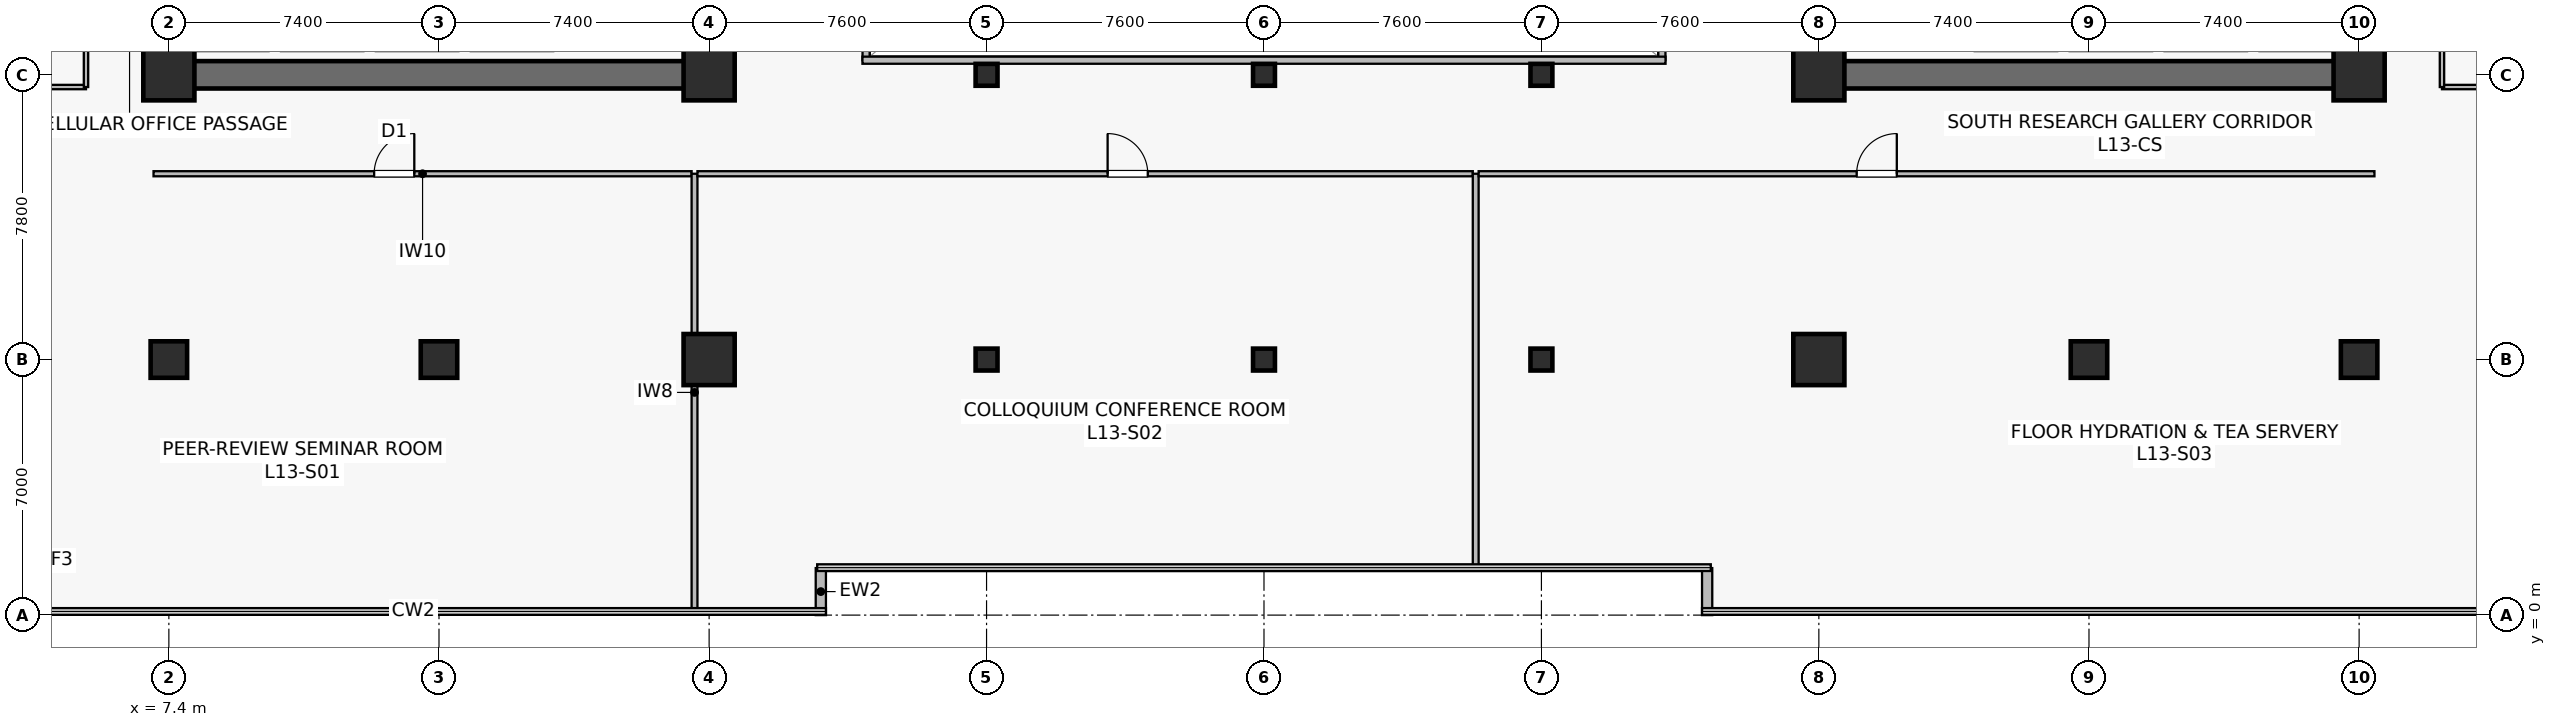
"""IFC4 building model, lengths in metres.
Left out: names, types, materials, properties, quantities, classifications, styles, units other than length and angle.
Written with IfcOpenShell. Run it as: python <this file> out.ifc"""

import sys

from ifc_helpers import new_model, si_unit, direction, frame, frame_2d, origin, origin_2d, place, context, subcontext, project, spatial, rectangle, hollow_rectangle, extrude, source, transform, mapped, element, fill, save


model = new_model("IFC4")
c1 = context("Model", 3, precision=1e-05, world=origin(), true_north=direction((0.0, 1.0)))
c2 = subcontext(c1, "Body", "Model", "MODEL_VIEW")
j1 = project(units=[si_unit("LENGTHUNIT", "METRE"), si_unit("PLANEANGLEUNIT", "RADIAN")], contexts=[c1])
p1 = place(None, origin())
s1 = spatial("IfcSite", under=j1, at=p1, CompositionType="ELEMENT")
p2 = place(p1, origin())
s2 = spatial("IfcBuilding", under=s1, at=p2, CompositionType="ELEMENT")
p3 = place(p2, frame((0.0, 0.0, 53.9)))
s3 = spatial("IfcBuildingStorey", under=s2, at=p3, CompositionType="ELEMENT", Elevation=53.9)
p4 = place(p3, frame((7.025, 14.8, 0.0), z_axis=(0.0, 0.0, 1.0), x_axis=(1.0, 0.0, 0.0)))
e1 = element("IfcWall", 1, at=p4, inside=s3, PredefinedType="SHEAR", context=c2, shape_type="SweptSolid", body=[
    extrude(rectangle(XDim=15.55, YDim=0.75, at=frame_2d((7.775, 0.0))), origin(), (0.0, 0.0, 1.0), 3.78),
])
p5 = place(p3, frame((7.4, 15.175, 0.0), z_axis=(0.0, 0.0, 1.0), x_axis=(0.0, 1.0, 0.0)))
e2 = element("IfcWall", 2, at=p5, inside=s3, PredefinedType="SHEAR", context=c2, shape_type="SweptSolid", body=[
    extrude(rectangle(XDim=18.25, YDim=0.75, at=frame_2d((9.125, 0.0))), origin(), (0.0, 0.0, 1.0), 3.78),
])
p6 = place(p3, frame((22.2, 15.175, 0.0), z_axis=(0.0, 0.0, 1.0), x_axis=(0.0, 1.0, 0.0)))
e3 = element("IfcWall", 3, at=p6, inside=s3, PredefinedType="SHEAR", context=c2, shape_type="SweptSolid", body=[
    extrude(rectangle(XDim=18.25, YDim=0.75, at=frame_2d((9.125, 0.0))), origin(), (0.0, 0.0, 1.0), 3.78),
])
p7 = place(p6, frame((3.375, 0.0, 0.0)))
e4 = element("IfcOpeningElement", 4, at=p7, cuts=e3, PredefinedType="OPENING", context=c2, shape_type="SweptSolid", body=[
    extrude(rectangle(XDim=1.42, YDim=2.2, at=frame_2d((0.71, 1.1))), frame((0.0, 0.385, 0.0), z_axis=(0.0, -1.0, 0.0), x_axis=(1.0, 0.0, 0.0)), (0.0, 0.0, 1.0), 0.77),
])
p8 = place(p3, frame((52.225, 14.8, 0.0), z_axis=(0.0, 0.0, 1.0), x_axis=(1.0, 0.0, 0.0)))
e5 = element("IfcWall", 5, at=p8, inside=s3, PredefinedType="SHEAR", context=c2, shape_type="SweptSolid", body=[
    extrude(rectangle(XDim=15.55, YDim=0.75, at=frame_2d((7.775, 0.0))), origin(), (0.0, 0.0, 1.0), 3.78),
])
p9 = place(p3, frame((52.6, 15.175, 0.0), z_axis=(0.0, 0.0, 1.0), x_axis=(0.0, 1.0, 0.0)))
e6 = element("IfcWall", 6, at=p9, inside=s3, PredefinedType="SHEAR", context=c2, shape_type="SweptSolid", body=[
    extrude(rectangle(XDim=18.25, YDim=0.75, at=frame_2d((9.125, 0.0))), origin(), (0.0, 0.0, 1.0), 3.78),
])
p10 = place(p9, frame((3.375, 0.0, 0.0)))
e7 = element("IfcOpeningElement", 7, at=p10, cuts=e6, PredefinedType="OPENING", context=c2, shape_type="SweptSolid", body=[
    extrude(rectangle(XDim=1.42, YDim=2.2, at=frame_2d((0.71, 1.1))), frame((0.0, 0.385, 0.0), z_axis=(0.0, -1.0, 0.0), x_axis=(1.0, 0.0, 0.0)), (0.0, 0.0, 1.0), 0.77),
])
p11 = place(p3, frame((67.4, 15.175, 0.0), z_axis=(0.0, 0.0, 1.0), x_axis=(0.0, 1.0, 0.0)))
e8 = element("IfcWall", 8, at=p11, inside=s3, PredefinedType="SHEAR", context=c2, shape_type="SweptSolid", body=[
    extrude(rectangle(XDim=18.25, YDim=0.75, at=frame_2d((9.125, 0.0))), origin(), (0.0, 0.0, 1.0), 3.78),
])
m1 = source(origin(), c2, "Body", "SweptSolid", [
    extrude(rectangle(XDim=1.0, YDim=1.0, at=origin_2d()), origin(), (0.0, 0.0, 1.0), 4.1),
])
p12 = place(p3, frame((14.8, 7.0, 0.0), z_axis=(0.0, 0.0, 1.0), x_axis=(1.0, 0.0, 0.0)))
e9 = element("IfcColumn", 9, at=p12, inside=s3, PredefinedType="COLUMN", context=c2, shape_type="MappedRepresentation", body=[
    mapped(m1, transform((0.0, 0.0, 0.0), scale=1.0)),
])
m2 = source(origin(), c2, "Body", "SweptSolid", [
    extrude(rectangle(XDim=1.4, YDim=1.4, at=origin_2d()), origin(), (0.0, 0.0, 1.0), 4.1),
])
for number, where, z_axis, x_axis in (
    (10, (22.2, 7.0, 0.0), (0.0, 0.0, 1.0), (1.0, 0.0, 0.0)),
    (11, (7.4, 14.8, 0.0), (0.0, 0.0, 1.0), (1.0, 0.0, 0.0)),
    (12, (22.2, 14.8, 0.0), (0.0, 0.0, 1.0), (1.0, 0.0, 0.0)),
    (13, (52.6, 7.0, 0.0), (0.0, 0.0, 1.0), (1.0, 0.0, 0.0)),
):
    element("IfcColumn", number, at=place(p3, frame(where, z_axis=z_axis, x_axis=x_axis)), inside=s3, PredefinedType="COLUMN", context=c2, shape_type="MappedRepresentation", body=[
        mapped(m2, transform((0.0, 0.0, 0.0), scale=1.0)),
    ])
p13 = place(p3, frame((60.0, 7.0, 0.0), z_axis=(0.0, 0.0, 1.0), x_axis=(1.0, 0.0, 0.0)))
e14 = element("IfcColumn", 14, at=p13, inside=s3, PredefinedType="COLUMN", context=c2, shape_type="MappedRepresentation", body=[
    mapped(m1, transform((0.0, 0.0, 0.0), scale=1.0)),
])
for number, where, z_axis, x_axis in (
    (15, (52.6, 14.8, 0.0), (0.0, 0.0, 1.0), (1.0, 0.0, 0.0)),
    (16, (67.4, 14.8, 0.0), (0.0, 0.0, 1.0), (1.0, 0.0, 0.0)),
):
    element("IfcColumn", number, at=place(p3, frame(where, z_axis=z_axis, x_axis=x_axis)), inside=s3, PredefinedType="COLUMN", context=c2, shape_type="MappedRepresentation", body=[
        mapped(m2, transform((0.0, 0.0, 0.0), scale=1.0)),
    ])
for number, where, z_axis, x_axis in (
    (17, (7.4, 7.0, 0.0), (0.0, 0.0, 1.0), (1.0, 0.0, 0.0)),
    (18, (67.4, 7.0, 0.0), (0.0, 0.0, 1.0), (1.0, 0.0, 0.0)),
):
    element("IfcColumn", number, at=place(p3, frame(where, z_axis=z_axis, x_axis=x_axis)), inside=s3, PredefinedType="COLUMN", context=c2, shape_type="MappedRepresentation", body=[
        mapped(m1, transform((0.0, 0.0, 0.0), scale=1.0)),
    ])
m3 = source(origin(), c2, "Body", "SweptSolid", [
    extrude(hollow_rectangle(XDim=0.6, YDim=0.6, WallThickness=0.028, at=origin_2d()), origin(), (0.0, 0.0, 1.0), 4.1),
])
for number, where, z_axis, x_axis in (
    (19, (29.8, 7.0, 0.0), (0.0, 0.0, 1.0), (1.0, 0.0, 0.0)),
    (20, (29.8, 14.8, 0.0), (0.0, 0.0, 1.0), (1.0, 0.0, 0.0)),
    (21, (37.4, 7.0, 0.0), (0.0, 0.0, 1.0), (1.0, 0.0, 0.0)),
    (22, (37.4, 14.8, 0.0), (0.0, 0.0, 1.0), (1.0, 0.0, 0.0)),
    (23, (45.0, 7.0, 0.0), (0.0, 0.0, 1.0), (1.0, 0.0, 0.0)),
    (24, (45.0, 14.8, 0.0), (0.0, 0.0, 1.0), (1.0, 0.0, 0.0)),
):
    element("IfcColumn", number, at=place(p3, frame(where, z_axis=z_axis, x_axis=x_axis)), inside=s3, PredefinedType="COLUMN", context=c2, shape_type="MappedRepresentation", body=[
        mapped(m3, transform((0.0, 0.0, 0.0), scale=1.0)),
    ])
for number, where, z_axis, x_axis in (
    (25, (25.26, 0.0, 0.0), (0.0, 0.0, 1.0), (0.0, 1.0, 0.0)),
    (26, (49.54, 1.288, 0.0), (0.0, 0.0, 1.0), (0.0, -1.0, 0.0)),
):
    element("IfcWall", number, at=place(p3, frame(where, z_axis=z_axis, x_axis=x_axis)), inside=s3, PredefinedType="STANDARD", context=c2, shape_type="SweptSolid", body=[
        extrude(rectangle(XDim=1.288, YDim=0.28, at=frame_2d((0.644, 0.0))), origin(), (0.0, 0.0, 1.0), 3.78),
    ])
p14 = place(p3, frame((26.5, 15.2, 0.0), z_axis=(0.0, 0.0, 1.0), x_axis=(0.0, 1.0, 0.0)))
e27 = element("IfcWall", 27, at=p14, inside=s3, PredefinedType="SOLIDWALL", context=c2, shape_type="SweptSolid", body=[
    extrude(rectangle(XDim=18.2, YDim=0.195, at=frame_2d((9.1, 0.0))), origin(), (0.0, 0.0, 1.0), 3.78),
])
p15 = place(p14, frame((1.8, 0.0, 0.9)))
e28 = element("IfcOpeningElement", 28, at=p15, cuts=e27, PredefinedType="OPENING", context=c2, shape_type="SweptSolid", body=[
    extrude(rectangle(XDim=1.2, YDim=1.35, at=frame_2d((0.6, 0.675))), frame((0.0, 0.107, 0.0), z_axis=(0.0, -1.0, 0.0), x_axis=(1.0, 0.0, 0.0)), (0.0, 0.0, 1.0), 0.215),
])
p16 = place(p14, frame((13.2, 0.0, 0.9)))
e29 = element("IfcOpeningElement", 29, at=p16, cuts=e27, PredefinedType="OPENING", context=c2, shape_type="SweptSolid", body=[
    extrude(rectangle(XDim=1.2, YDim=1.35, at=frame_2d((0.6, 0.675))), frame((0.0, 0.107, 0.0), z_axis=(0.0, -1.0, 0.0), x_axis=(1.0, 0.0, 0.0)), (0.0, 0.0, 1.0), 0.215),
])
p17 = place(p3, frame((48.3, 15.2, 0.0), z_axis=(0.0, 0.0, 1.0), x_axis=(0.0, 1.0, 0.0)))
e30 = element("IfcWall", 30, at=p17, inside=s3, PredefinedType="SOLIDWALL", context=c2, shape_type="SweptSolid", body=[
    extrude(rectangle(XDim=18.2, YDim=0.195, at=frame_2d((9.1, 0.0))), origin(), (0.0, 0.0, 1.0), 3.78),
])
p18 = place(p17, frame((1.8, 0.0, 0.9)))
e31 = element("IfcOpeningElement", 31, at=p18, cuts=e30, PredefinedType="OPENING", context=c2, shape_type="SweptSolid", body=[
    extrude(rectangle(XDim=1.2, YDim=1.35, at=frame_2d((0.6, 0.675))), frame((0.0, 0.107, 0.0), z_axis=(0.0, -1.0, 0.0), x_axis=(1.0, 0.0, 0.0)), (0.0, 0.0, 1.0), 0.215),
])
p19 = place(p17, frame((13.2, 0.0, 0.9)))
e32 = element("IfcOpeningElement", 32, at=p19, cuts=e30, PredefinedType="OPENING", context=c2, shape_type="SweptSolid", body=[
    extrude(rectangle(XDim=1.2, YDim=1.35, at=frame_2d((0.6, 0.675))), frame((0.0, 0.107, 0.0), z_axis=(0.0, -1.0, 0.0), x_axis=(1.0, 0.0, 0.0)), (0.0, 0.0, 1.0), 0.215),
])
p20 = place(p3, frame((26.4, 15.2, 0.0), z_axis=(0.0, 0.0, 1.0), x_axis=(1.0, 0.0, 0.0)))
e33 = element("IfcWall", 33, at=p20, inside=s3, PredefinedType="SOLIDWALL", context=c2, shape_type="SweptSolid", body=[
    extrude(rectangle(XDim=22.0, YDim=0.195, at=frame_2d((11.0, 0.0))), origin(), (0.0, 0.0, 1.0), 3.78),
])
p21 = place(p3, frame((6.98, 12.09, 0.0), z_axis=(0.0, 0.0, 1.0), x_axis=(1.0, 0.0, 0.0)))
e34 = element("IfcWall", 34, at=p21, inside=s3, PredefinedType="PARTITIONING", context=c2, shape_type="SweptSolid", body=[
    extrude(rectangle(XDim=14.74, YDim=0.14, at=frame_2d((7.37, 0.0))), origin(), (0.0, 0.0, 1.0), 3.065),
])
p22 = place(p21, frame((6.044, 0.0, 0.0)))
e35 = element("IfcOpeningElement", 35, at=p22, cuts=e34, PredefinedType="OPENING", context=c2, shape_type="SweptSolid", body=[
    extrude(rectangle(XDim=1.1, YDim=2.18, at=frame_2d((0.55, 1.09))), frame((0.0, 0.08, 0.0), z_axis=(0.0, -1.0, 0.0), x_axis=(1.0, 0.0, 0.0)), (0.0, 0.0, 1.0), 0.16),
])
p23 = place(p3, frame((21.8, 0.11, 0.0), z_axis=(0.0, 0.0, 1.0), x_axis=(0.0, 1.0, 0.0)))
e36 = element("IfcWall", 36, at=p23, inside=s3, PredefinedType="PARTITIONING", context=c2, shape_type="SweptSolid", body=[
    extrude(rectangle(XDim=11.98, YDim=0.16, at=frame_2d((5.99, 0.0))), origin(), (0.0, 0.0, 1.0), 3.015),
])
p24 = place(p3, frame((21.88, 12.09, 0.0), z_axis=(0.0, 0.0, 1.0), x_axis=(1.0, 0.0, 0.0)))
e37 = element("IfcWall", 37, at=p24, inside=s3, PredefinedType="PARTITIONING", context=c2, shape_type="SweptSolid", body=[
    extrude(rectangle(XDim=21.24, YDim=0.14, at=frame_2d((10.62, 0.0))), origin(), (0.0, 0.0, 1.0), 3.065),
])
p25 = place(p24, frame((11.236, 0.0, 0.0)))
e38 = element("IfcOpeningElement", 38, at=p25, cuts=e37, PredefinedType="OPENING", context=c2, shape_type="SweptSolid", body=[
    extrude(rectangle(XDim=1.1, YDim=2.18, at=frame_2d((0.55, 1.09))), frame((0.0, 0.08, 0.0), z_axis=(0.0, -1.0, 0.0), x_axis=(1.0, 0.0, 0.0)), (0.0, 0.0, 1.0), 0.16),
])
p26 = place(p3, frame((43.2, 1.31, 0.0), z_axis=(0.0, 0.0, 1.0), x_axis=(0.0, 1.0, 0.0)))
e39 = element("IfcWall", 39, at=p26, inside=s3, PredefinedType="PARTITIONING", context=c2, shape_type="SweptSolid", body=[
    extrude(rectangle(XDim=10.78, YDim=0.16, at=frame_2d((5.39, 0.0))), origin(), (0.0, 0.0, 1.0), 3.015),
])
p27 = place(p3, frame((43.28, 12.09, 0.0), z_axis=(0.0, 0.0, 1.0), x_axis=(1.0, 0.0, 0.0)))
e40 = element("IfcWall", 40, at=p27, inside=s3, PredefinedType="PARTITIONING", context=c2, shape_type="SweptSolid", body=[
    extrude(rectangle(XDim=24.54, YDim=0.14, at=frame_2d((12.27, 0.0))), origin(), (0.0, 0.0, 1.0), 3.065),
])
p28 = place(p27, frame((10.356, 0.0, 0.0)))
e41 = element("IfcOpeningElement", 41, at=p28, cuts=e40, PredefinedType="OPENING", context=c2, shape_type="SweptSolid", body=[
    extrude(rectangle(XDim=1.1, YDim=2.18, at=frame_2d((0.55, 1.09))), frame((0.0, 0.08, 0.0), z_axis=(0.0, -1.0, 0.0), x_axis=(1.0, 0.0, 0.0)), (0.0, 0.0, 1.0), 0.16),
])
p29 = place(p3, frame((0.11, 14.465, 0.0), z_axis=(0.0, 0.0, 1.0), x_axis=(1.0, 0.0, 0.0)))
e42 = element("IfcWall", 42, at=p29, inside=s3, PredefinedType="PARTITIONING", context=c2, shape_type="SweptSolid", body=[
    extrude(rectangle(XDim=5.02, YDim=0.12, at=frame_2d((2.51, 0.0))), origin(), (0.0, 0.0, 1.0), 3.78),
])
p30 = place(p3, frame((5.13, 14.465, 0.0), z_axis=(0.0, 0.0, 1.0), x_axis=(0.0, 1.0, 0.0)))
e43 = element("IfcWall", 43, at=p30, inside=s3, PredefinedType="PARTITIONING", context=c2, shape_type="SweptSolid", body=[
    extrude(rectangle(XDim=4.675, YDim=0.12, at=frame_2d((2.337, 0.0))), origin(), (0.0, 0.0, 1.0), 3.78),
])
p31 = place(p30, frame((1.887, 0.0, 0.0)))
e44 = element("IfcOpeningElement", 44, at=p31, cuts=e43, PredefinedType="OPENING", context=c2, shape_type="SweptSolid", body=[
    extrude(rectangle(XDim=0.9, YDim=2.1, at=frame_2d((0.45, 1.05))), frame((0.0, 0.07, 0.0), z_axis=(0.0, -1.0, 0.0), x_axis=(1.0, 0.0, 0.0)), (0.0, 0.0, 1.0), 0.14),
])
p32 = place(p3, frame((69.67, 14.465, 0.0), z_axis=(0.0, 0.0, 1.0), x_axis=(1.0, 0.0, 0.0)))
e45 = element("IfcWall", 45, at=p32, inside=s3, PredefinedType="PARTITIONING", context=c2, shape_type="SweptSolid", body=[
    extrude(rectangle(XDim=5.02, YDim=0.12, at=frame_2d((2.51, 0.0))), origin(), (0.0, 0.0, 1.0), 3.78),
])
p33 = place(p3, frame((69.67, 14.465, 0.0), z_axis=(0.0, 0.0, 1.0), x_axis=(0.0, 1.0, 0.0)))
e46 = element("IfcWall", 46, at=p33, inside=s3, PredefinedType="PARTITIONING", context=c2, shape_type="SweptSolid", body=[
    extrude(rectangle(XDim=11.875, YDim=0.12, at=frame_2d((5.938, 0.0))), origin(), (0.0, 0.0, 1.0), 3.78),
])
p34 = place(p33, frame((5.488, 0.0, 0.0)))
e47 = element("IfcOpeningElement", 47, at=p34, cuts=e46, PredefinedType="OPENING", context=c2, shape_type="SweptSolid", body=[
    extrude(rectangle(XDim=0.9, YDim=2.1, at=frame_2d((0.45, 1.05))), frame((0.0, 0.07, 0.0), z_axis=(0.0, -1.0, 0.0), x_axis=(1.0, 0.0, 0.0)), (0.0, 0.0, 1.0), 0.14),
])
m4 = source(origin(), c2, "Body", "SweptSolid", [
    extrude(rectangle(XDim=1.1, YDim=2.18, at=frame_2d((0.55, 1.09))), frame((0.0, 0.025, 0.0), z_axis=(0.0, -1.0, 0.0), x_axis=(1.0, 0.0, 0.0)), (0.0, 0.0, 1.0), 0.05),
])
p35 = place(p22, origin())
e48 = element("IfcDoor", 48, at=p35, inside=s3, OperationType="SINGLE_SWING_RIGHT", PredefinedType="DOOR", context=c2, shape_type="MappedRepresentation", body=[
    mapped(m4, transform((0.0, 0.0, 0.0), scale=1.0)),
])
fill(e35, e48)
p36 = place(p25, origin())
e49 = element("IfcDoor", 49, at=p36, inside=s3, OperationType="SINGLE_SWING_LEFT", PredefinedType="DOOR", context=c2, shape_type="MappedRepresentation", body=[
    mapped(m4, transform((0.0, 0.0, 0.0), scale=1.0)),
])
fill(e38, e49)
p37 = place(p28, origin())
e50 = element("IfcDoor", 50, at=p37, inside=s3, OperationType="SINGLE_SWING_RIGHT", PredefinedType="DOOR", context=c2, shape_type="MappedRepresentation", body=[
    mapped(m4, transform((0.0, 0.0, 0.0), scale=1.0)),
])
fill(e41, e50)
save(model, sys.argv[1])
